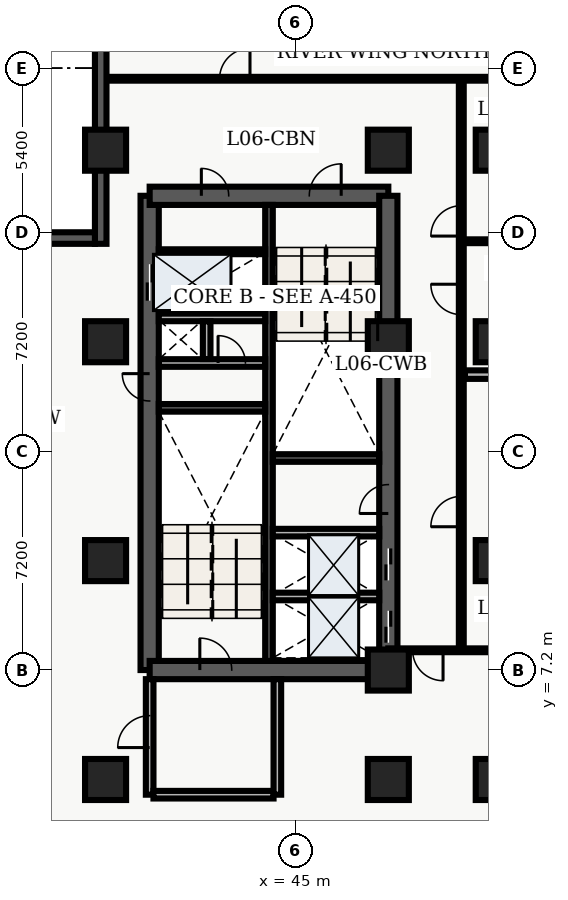
"""IFC4 building model, lengths in metres.
Left out: names, types, materials, properties, quantities, classifications, styles, units other than length and angle.
Written with IfcOpenShell. Run it as: python <this file> out.ifc"""

import sys

from ifc_helpers import new_model, entity, si_unit, converted_unit, direction, frame, origin_with_axes, origin_2d_with_axis, place, context, subcontext, project, spatial, polyline, rectangle, outline, extrude, element, fill, save


model = new_model("IFC4")
c1 = context("Model", 3, precision=1e-05, world=origin_with_axes(), true_north=direction((0.0, 1.0)))
c2 = subcontext(c1, "Body", "Model", "MODEL_VIEW")
j1 = project(units=[si_unit("LENGTHUNIT", "METRE"), converted_unit("PLANEANGLEUNIT", "DEGREE", entity("IfcPlaneAngleMeasure", 0.017), si_unit("PLANEANGLEUNIT", "RADIAN"), dimensions=[0, 0, 0, 0, 0, 0, 0])], contexts=[c1])
p1 = place(None, origin_with_axes())
s1 = spatial("IfcSite", under=j1, at=p1, CompositionType="ELEMENT")
p2 = place(p1, origin_with_axes())
s2 = spatial("IfcBuilding", under=s1, at=p2, CompositionType="ELEMENT")
p3 = place(p2, frame((0.0, 0.0, 28.8), z_axis=(0.0, 0.0, 1.0), x_axis=(1.0, 0.0, 0.0)))
s3 = spatial("IfcBuildingStorey", under=s2, at=p3, CompositionType="ELEMENT", Elevation=28.8)
p4 = place(p3, frame((40.2, 7.2, 0.0), z_axis=(0.0, 0.0, 1.0), x_axis=(0.0, 1.0, 0.0)))
e1 = element("IfcWall", 1, at=p4, inside=s3, PredefinedType="SHEAR", context=c2, shape_type="SweptSolid", body=[
    extrude(outline(polyline([(0.0, -0.3), (15.6, -0.3), (15.6, 0.3), (0.0, 0.3), (0.0, -0.3)])), origin_with_axes(), (0.0, 0.0, 1.0), 3.66),
])
p5 = place(p4, frame((12.75, 0.0, 0.0), z_axis=(0.0, 0.0, 1.0), x_axis=(1.0, 0.0, 0.0)))
e2 = element("IfcOpeningElement", 2, at=p5, cuts=e1, PredefinedType="OPENING", context=c2, shape_type="SweptSolid", body=[
    extrude(rectangle(XDim=1.2, YDim=0.62, at=origin_2d_with_axis()), origin_with_axes(), (0.0, 0.0, 1.0), 2.15),
])
p6 = place(p4, frame((9.3, 0.0, 0.0), z_axis=(0.0, 0.0, 1.0), x_axis=(1.0, 0.0, 0.0)))
e3 = element("IfcOpeningElement", 3, at=p6, cuts=e1, PredefinedType="OPENING", context=c2, shape_type="SweptSolid", body=[
    extrude(rectangle(XDim=0.9, YDim=0.62, at=origin_2d_with_axis()), origin_with_axes(), (0.0, 0.0, 1.0), 2.15),
])
p7 = place(p3, frame((40.2, 7.2, 0.0), z_axis=(0.0, 0.0, 1.0), x_axis=(1.0, 0.0, 0.0)))
e4 = element("IfcWall", 4, at=p7, inside=s3, PredefinedType="SHEAR", context=c2, shape_type="SweptSolid", body=[
    extrude(outline(polyline([(0.0, -0.3), (7.85, -0.3), (7.85, 0.3), (0.0, 0.3), (0.0, -0.3)])), origin_with_axes(), (0.0, 0.0, 1.0), 3.66),
])
p8 = place(p7, frame((2.175, 0.0, 0.0), z_axis=(0.0, 0.0, 1.0), x_axis=(1.0, 0.0, 0.0)))
e5 = element("IfcOpeningElement", 5, at=p8, cuts=e4, PredefinedType="OPENING", context=c2, shape_type="SweptSolid", body=[
    extrude(rectangle(XDim=1.05, YDim=0.62, at=origin_2d_with_axis()), origin_with_axes(), (0.0, 0.0, 1.0), 2.15),
])
p9 = place(p3, frame((40.2, 22.8, 0.0), z_axis=(0.0, 0.0, 1.0), x_axis=(1.0, 0.0, 0.0)))
e6 = element("IfcWall", 6, at=p9, inside=s3, PredefinedType="SHEAR", context=c2, shape_type="SweptSolid", body=[
    extrude(outline(polyline([(0.0, -0.3), (7.85, -0.3), (7.85, 0.3), (0.0, 0.3), (0.0, -0.3)])), origin_with_axes(), (0.0, 0.0, 1.0), 3.66),
])
p10 = place(p9, frame((5.775, 0.0, 0.0), z_axis=(0.0, 0.0, 1.0), x_axis=(1.0, 0.0, 0.0)))
e7 = element("IfcOpeningElement", 7, at=p10, cuts=e6, PredefinedType="OPENING", context=c2, shape_type="SweptSolid", body=[
    extrude(rectangle(XDim=1.05, YDim=0.62, at=origin_2d_with_axis()), origin_with_axes(), (0.0, 0.0, 1.0), 2.15),
])
p11 = place(p9, frame((2.15, 0.0, 0.0), z_axis=(0.0, 0.0, 1.0), x_axis=(1.0, 0.0, 0.0)))
e8 = element("IfcOpeningElement", 8, at=p11, cuts=e6, PredefinedType="OPENING", context=c2, shape_type="SweptSolid", body=[
    extrude(rectangle(XDim=0.9, YDim=0.62, at=origin_2d_with_axis()), origin_with_axes(), (0.0, 0.0, 1.0), 2.15),
])
p12 = place(p3, frame((48.05, 7.2, 0.0), z_axis=(0.0, 0.0, 1.0), x_axis=(0.0, 1.0, 0.0)))
e9 = element("IfcWall", 9, at=p12, inside=s3, PredefinedType="SHEAR", context=c2, shape_type="SweptSolid", body=[
    extrude(outline(polyline([(0.0, -0.3), (15.6, -0.3), (15.6, 0.3), (0.0, 0.3), (0.0, -0.3)])), origin_with_axes(), (0.0, 0.0, 1.0), 3.66),
])
p13 = place(p12, frame((1.425, 0.0, 0.0), z_axis=(0.0, 0.0, 1.0), x_axis=(1.0, 0.0, 0.0)))
e10 = element("IfcOpeningElement", 10, at=p13, cuts=e9, PredefinedType="OPENING", context=c2, shape_type="SweptSolid", body=[
    extrude(rectangle(XDim=1.05, YDim=0.62, at=origin_2d_with_axis()), origin_with_axes(), (0.0, 0.0, 1.0), 2.15),
])
p14 = place(p12, frame((3.475, 0.0, 0.0), z_axis=(0.0, 0.0, 1.0), x_axis=(1.0, 0.0, 0.0)))
e11 = element("IfcOpeningElement", 11, at=p14, cuts=e9, PredefinedType="OPENING", context=c2, shape_type="SweptSolid", body=[
    extrude(rectangle(XDim=1.05, YDim=0.62, at=origin_2d_with_axis()), origin_with_axes(), (0.0, 0.0, 1.0), 2.15),
])
p15 = place(p12, frame((5.625, 0.0, 0.0), z_axis=(0.0, 0.0, 1.0), x_axis=(1.0, 0.0, 0.0)))
e12 = element("IfcOpeningElement", 12, at=p15, cuts=e9, PredefinedType="OPENING", context=c2, shape_type="SweptSolid", body=[
    extrude(rectangle(XDim=0.95, YDim=0.62, at=origin_2d_with_axis()), origin_with_axes(), (0.0, 0.0, 1.0), 2.15),
])
p16 = place(p3, frame((44.125, 7.5, 0.0), z_axis=(0.0, 0.0, 1.0), x_axis=(0.0, 1.0, 0.0)))
e13 = element("IfcWall", 13, at=p16, inside=s3, PredefinedType="SHEAR", context=c2, shape_type="SweptSolid", body=[
    extrude(outline(polyline([(0.0, -0.125), (15.0, -0.125), (15.0, 0.125), (0.0, 0.125), (0.0, -0.125)])), origin_with_axes(), (0.0, 0.0, 1.0), 3.66),
])
for number, where, z_axis, x_axis in (
    (14, (40.5, 15.825, 0.0), (0.0, 0.0, 1.0), (1.0, 0.0, 0.0)),
    (15, (44.25, 14.175, 0.0), (0.0, 0.0, 1.0), (1.0, 0.0, 0.0)),
):
    element("IfcWall", number, at=place(p3, frame(where, z_axis=z_axis, x_axis=x_axis)), inside=s3, PredefinedType="SHEAR", context=c2, shape_type="SweptSolid", body=[
        extrude(outline(polyline([(0.0, -0.125), (3.5, -0.125), (3.5, 0.125), (0.0, 0.125), (0.0, -0.125)])), origin_with_axes(), (0.0, 0.0, 1.0), 3.66),
    ])
p17 = place(p3, frame((40.5, 17.3, 0.0), z_axis=(0.0, 0.0, 1.0), x_axis=(1.0, 0.0, 0.0)))
e16 = element("IfcWall", 16, at=p17, inside=s3, PredefinedType="SOLIDWALL", context=c2, shape_type="SweptSolid", body=[
    extrude(outline(polyline([(0.0, -0.125), (3.5, -0.125), (3.5, 0.125), (0.0, 0.125), (0.0, -0.125)])), origin_with_axes(), (0.0, 0.0, 1.0), 2.7),
])
p18 = place(p17, frame((2.4, 0.0, 0.0), z_axis=(0.0, 0.0, 1.0), x_axis=(1.0, 0.0, 0.0)))
e17 = element("IfcOpeningElement", 17, at=p18, cuts=e16, PredefinedType="OPENING", context=c2, shape_type="SweptSolid", body=[
    extrude(rectangle(XDim=0.9, YDim=0.27, at=origin_2d_with_axis()), origin_with_axes(), (0.0, 0.0, 1.0), 2.15),
])
p19 = place(p3, frame((40.5, 18.8, 0.0), z_axis=(0.0, 0.0, 1.0), x_axis=(1.0, 0.0, 0.0)))
e18 = element("IfcWall", 18, at=p19, inside=s3, PredefinedType="SOLIDWALL", context=c2, shape_type="SweptSolid", body=[
    extrude(outline(polyline([(0.0, -0.125), (3.5, -0.125), (3.5, 0.125), (0.0, 0.125), (0.0, -0.125)])), origin_with_axes(), (0.0, 0.0, 1.0), 2.7),
])
p20 = place(p3, frame((42.075, 17.43, 0.0), z_axis=(0.0, 0.0, 1.0), x_axis=(0.0, 1.0, 0.0)))
e19 = element("IfcWall", 19, at=p20, inside=s3, PredefinedType="SOLIDWALL", context=c2, shape_type="SweptSolid", body=[
    extrude(outline(polyline([(0.0, -0.125), (1.24, -0.125), (1.24, 0.125), (0.0, 0.125), (0.0, -0.125)])), origin_with_axes(), (0.0, 0.0, 1.0), 2.7),
])
p21 = place(p3, frame((40.2, 3.1, 0.0), z_axis=(0.0, 0.0, 1.0), x_axis=(0.0, 1.0, 0.0)))
e20 = element("IfcWall", 20, at=p21, inside=s3, PredefinedType="SOLIDWALL", context=c2, shape_type="SweptSolid", body=[
    extrude(outline(polyline([(0.0, -0.125), (3.8, -0.125), (3.8, 0.125), (0.0, 0.125), (0.0, -0.125)])), origin_with_axes(), (0.0, 0.0, 1.0), 2.7),
])
p22 = place(p21, frame((2.075, 0.0, 0.0), z_axis=(0.0, 0.0, 1.0), x_axis=(1.0, 0.0, 0.0)))
e21 = element("IfcOpeningElement", 21, at=p22, cuts=e20, PredefinedType="OPENING", context=c2, shape_type="SweptSolid", body=[
    extrude(rectangle(XDim=1.05, YDim=0.27, at=origin_2d_with_axis()), origin_with_axes(), (0.0, 0.0, 1.0), 2.15),
])
p23 = place(p3, frame((40.325, 3.1, 0.0), z_axis=(0.0, 0.0, 1.0), x_axis=(1.0, 0.0, 0.0)))
e22 = element("IfcWall", 22, at=p23, inside=s3, PredefinedType="SOLIDWALL", context=c2, shape_type="SweptSolid", body=[
    extrude(outline(polyline([(0.0, -0.125), (3.95, -0.125), (3.95, 0.125), (0.0, 0.125), (0.0, -0.125)])), origin_with_axes(), (0.0, 0.0, 1.0), 2.7),
])
p24 = place(p3, frame((44.4, 3.1, 0.0), z_axis=(0.0, 0.0, 1.0), x_axis=(0.0, 1.0, 0.0)))
e23 = element("IfcWall", 23, at=p24, inside=s3, PredefinedType="SOLIDWALL", context=c2, shape_type="SweptSolid", body=[
    extrude(outline(polyline([(0.0, -0.125), (3.8, -0.125), (3.8, 0.125), (0.0, 0.125), (0.0, -0.125)])), origin_with_axes(), (0.0, 0.0, 1.0), 2.7),
])
for number, where, z_axis, x_axis in (
    (24, (38.75, 3.6, 0.0), (0.0, 0.0, 1.0), (1.0, 0.0, 0.0)),
    (25, (38.75, 10.8, 0.0), (0.0, 0.0, 1.0), (1.0, 0.0, 0.0)),
    (26, (38.75, 18.0, 0.0), (0.0, 0.0, 1.0), (1.0, 0.0, 0.0)),
    (27, (38.75, 24.3, 0.0), (0.0, 0.0, 1.0), (1.0, 0.0, 0.0)),
    (28, (48.05, 3.6, 0.0), (0.0, 0.0, 1.0), (1.0, 0.0, 0.0)),
    (29, (48.05, 7.2, 0.0), (0.0, 0.0, 1.0), (1.0, 0.0, 0.0)),
    (30, (48.05, 18.0, 0.0), (0.0, 0.0, 1.0), (1.0, 0.0, 0.0)),
    (31, (48.05, 24.3, 0.0), (0.0, 0.0, 1.0), (1.0, 0.0, 0.0)),
    (32, (51.6, 3.6, 0.0), (0.0, 0.0, 1.0), (1.0, 0.0, 0.0)),
    (33, (51.6, 10.8, 0.0), (0.0, 0.0, 1.0), (1.0, 0.0, 0.0)),
    (34, (51.6, 18.0, 0.0), (0.0, 0.0, 1.0), (1.0, 0.0, 0.0)),
    (35, (51.6, 24.3, 0.0), (0.0, 0.0, 1.0), (1.0, 0.0, 0.0)),
):
    element("IfcColumn", number, at=place(p3, frame(where, z_axis=z_axis, x_axis=x_axis)), inside=s3, PredefinedType="COLUMN", context=c2, shape_type="SweptSolid", body=[
        extrude(rectangle(XDim=1.35, YDim=1.35, at=origin_2d_with_axis()), origin_with_axes(), (0.0, 0.0, 1.0), 3.9),
    ])
p25 = place(p3, frame((40.5, 20.96, 0.0), z_axis=(0.0, 0.0, 1.0), x_axis=(1.0, 0.0, 0.0)))
e36 = element("IfcWall", 36, at=p25, inside=s3, PredefinedType="PARTITIONING", context=c2, shape_type="SweptSolid", body=[
    extrude(outline(polyline([(0.0, -0.08), (3.5, -0.08), (3.5, 0.08), (0.0, 0.08), (0.0, -0.08)])), origin_with_axes(), (0.0, 0.0, 1.0), 2.7),
])
for number, where, z_axis, x_axis in (
    (37, (44.25, 9.62, 0.0), (0.0, 0.0, 1.0), (1.0, 0.0, 0.0)),
    (38, (44.25, 11.72, 0.0), (0.0, 0.0, 1.0), (1.0, 0.0, 0.0)),
):
    element("IfcWall", number, at=place(p3, frame(where, z_axis=z_axis, x_axis=x_axis)), inside=s3, PredefinedType="SOLIDWALL", context=c2, shape_type="SweptSolid", body=[
        extrude(outline(polyline([(0.0, -0.125), (3.5, -0.125), (3.5, 0.125), (0.0, 0.125), (0.0, -0.125)])), origin_with_axes(), (0.0, 0.0, 1.0), 2.7),
    ])
p26 = place(p3, frame((50.45, 7.85, 0.0), z_axis=(0.0, 0.0, 1.0), x_axis=(0.0, 1.0, 0.0)))
e39 = element("IfcWall", 39, at=p26, inside=s3, PredefinedType="PARTITIONING", context=c2, shape_type="SweptSolid", body=[
    extrude(outline(polyline([(0.0, -0.08), (18.8, -0.08), (18.8, 0.08), (0.0, 0.08), (0.0, -0.08)])), origin_with_axes(), (0.0, 0.0, 1.0), 2.7),
])
p27 = place(p26, frame((4.564, 0.0, 0.0), z_axis=(0.0, 0.0, 1.0), x_axis=(1.0, 0.0, 0.0)))
e40 = element("IfcOpeningElement", 40, at=p27, cuts=e39, PredefinedType="OPENING", context=c2, shape_type="SweptSolid", body=[
    extrude(rectangle(XDim=1.0, YDim=0.18, at=origin_2d_with_axis()), origin_with_axes(), (0.0, 0.0, 1.0), 2.15),
])
p28 = place(p26, frame((11.541, 0.0, 0.0), z_axis=(0.0, 0.0, 1.0), x_axis=(1.0, 0.0, 0.0)))
e41 = element("IfcOpeningElement", 41, at=p28, cuts=e39, PredefinedType="OPENING", context=c2, shape_type="SweptSolid", body=[
    extrude(rectangle(XDim=1.0, YDim=0.18, at=origin_2d_with_axis()), origin_with_axes(), (0.0, 0.0, 1.0), 2.15),
])
p29 = place(p26, frame((14.125, 0.0, 0.0), z_axis=(0.0, 0.0, 1.0), x_axis=(1.0, 0.0, 0.0)))
e42 = element("IfcOpeningElement", 42, at=p29, cuts=e39, PredefinedType="OPENING", context=c2, shape_type="SweptSolid", body=[
    extrude(rectangle(XDim=1.0, YDim=0.18, at=origin_2d_with_axis()), origin_with_axes(), (0.0, 0.0, 1.0), 2.15),
])
p30 = place(p3, frame((59.64, 7.85, 0.0), z_axis=(0.0, 0.0, 1.0), x_axis=(-1.0, 0.0, 0.0)))
e43 = element("IfcWall", 43, at=p30, inside=s3, PredefinedType="PARTITIONING", context=c2, shape_type="SweptSolid", body=[
    extrude(outline(polyline([(0.0, -0.062), (11.59, -0.062), (11.59, 0.062), (0.0, 0.062), (0.0, -0.062)])), origin_with_axes(), (0.0, 0.0, 1.0), 2.7),
])
p31 = place(p30, frame((10.29, 0.0, 0.0), z_axis=(0.0, 0.0, 1.0), x_axis=(1.0, 0.0, 0.0)))
e44 = element("IfcOpeningElement", 44, at=p31, cuts=e43, PredefinedType="OPENING", context=c2, shape_type="SweptSolid", body=[
    extrude(rectangle(XDim=1.0, YDim=0.145, at=origin_2d_with_axis()), origin_with_axes(), (0.0, 0.0, 1.0), 2.15),
])
p32 = place(p3, frame((38.76, 26.65, 0.0), z_axis=(0.0, 0.0, 1.0), x_axis=(1.0, 0.0, 0.0)))
e45 = element("IfcWall", 45, at=p32, inside=s3, PredefinedType="PARTITIONING", context=c2, shape_type="SweptSolid", body=[
    extrude(outline(polyline([(0.0, -0.062), (20.88, -0.062), (20.88, 0.062), (0.0, 0.062), (0.0, -0.062)])), origin_with_axes(), (0.0, 0.0, 1.0), 2.7),
])
p33 = place(p32, frame((4.24, 0.0, 0.0), z_axis=(0.0, 0.0, 1.0), x_axis=(1.0, 0.0, 0.0)))
e46 = element("IfcOpeningElement", 46, at=p33, cuts=e45, PredefinedType="OPENING", context=c2, shape_type="SweptSolid", body=[
    extrude(rectangle(XDim=1.0, YDim=0.145, at=origin_2d_with_axis()), origin_with_axes(), (0.0, 0.0, 1.0), 2.15),
])
p34 = place(p3, frame((50.57, 16.918, 0.0), z_axis=(0.0, 0.0, 1.0), x_axis=(1.0, 0.0, 0.0)))
e47 = element("IfcWall", 47, at=p34, inside=s3, PredefinedType="PARTITIONING", context=c2, shape_type="SweptSolid", body=[
    extrude(outline(polyline([(0.0, -0.14), (9.055, -0.14), (9.055, 0.14), (0.0, 0.14), (0.0, -0.14)])), origin_with_axes(), (0.0, 0.0, 1.0), 2.7),
])
p35 = place(p3, frame((50.57, 21.305, 0.0), z_axis=(0.0, 0.0, 1.0), x_axis=(1.0, 0.0, 0.0)))
e48 = element("IfcWall", 48, at=p35, inside=s3, PredefinedType="PARTITIONING", context=c2, shape_type="SweptSolid", body=[
    extrude(outline(polyline([(0.0, -0.062), (9.055, -0.062), (9.055, 0.062), (0.0, 0.062), (0.0, -0.062)])), origin_with_axes(), (0.0, 0.0, 1.0), 2.7),
])
p36 = place(p3, frame((38.59, 21.22, 0.0), z_axis=(0.0, 0.0, 1.0), x_axis=(0.0, 1.0, 0.0)))
e49 = element("IfcWall", 49, at=p36, inside=s3, PredefinedType="SOLIDWALL", context=c2, shape_type="SweptSolid", body=[
    extrude(outline(polyline([(0.0, -0.19), (7.58, -0.19), (7.58, 0.19), (0.0, 0.19), (0.0, -0.19)])), origin_with_axes(), (0.0, 0.0, 1.0), 3.66),
])
p37 = place(p3, frame((21.22, 21.41, 0.0), z_axis=(0.0, 0.0, 1.0), x_axis=(1.0, 0.0, 0.0)))
e50 = element("IfcWall", 50, at=p37, inside=s3, PredefinedType="SOLIDWALL", context=c2, shape_type="SweptSolid", body=[
    extrude(outline(polyline([(0.0, -0.19), (17.18, -0.19), (17.18, 0.19), (0.0, 0.19), (0.0, -0.19)])), origin_with_axes(), (0.0, 0.0, 1.0), 3.66),
])
p38 = place(p37, frame((3.263, 0.0, 0.45), z_axis=(0.0, 0.0, 1.0), x_axis=(1.0, 0.0, 0.0)))
e51 = element("IfcOpeningElement", 51, at=p38, cuts=e50, PredefinedType="OPENING", context=c2, shape_type="SweptSolid", body=[
    extrude(rectangle(XDim=2.1, YDim=0.4, at=origin_2d_with_axis()), origin_with_axes(), (0.0, 0.0, 1.0), 2.2),
])
p39 = place(p37, frame((8.59, 0.0, 0.45), z_axis=(0.0, 0.0, 1.0), x_axis=(1.0, 0.0, 0.0)))
e52 = element("IfcOpeningElement", 52, at=p39, cuts=e50, PredefinedType="OPENING", context=c2, shape_type="SweptSolid", body=[
    extrude(rectangle(XDim=2.1, YDim=0.4, at=origin_2d_with_axis()), origin_with_axes(), (0.0, 0.0, 1.0), 2.2),
])
p40 = place(p37, frame((13.467, 0.0, 0.45), z_axis=(0.0, 0.0, 1.0), x_axis=(1.0, 0.0, 0.0)))
e53 = element("IfcOpeningElement", 53, at=p40, cuts=e50, PredefinedType="OPENING", context=c2, shape_type="SweptSolid", body=[
    extrude(rectangle(XDim=2.1, YDim=0.4, at=origin_2d_with_axis()), origin_with_axes(), (0.0, 0.0, 1.0), 2.2),
])
p41 = place(p12, frame((1.425, 0.0, 0.0), z_axis=(0.0, 0.0, 1.0), x_axis=(1.0, 0.0, 0.0)))
e54 = element("IfcDoor", 54, at=p41, inside=s3, OperationType="SLIDING_TO_LEFT", PredefinedType="DOOR", context=c2, shape_type="SweptSolid", body=[
    extrude(rectangle(XDim=1.05, YDim=0.09, at=origin_2d_with_axis()), origin_with_axes(), (0.0, 0.0, 1.0), 2.15),
])
fill(e10, e54)
p42 = place(p12, frame((3.475, 0.0, 0.0), z_axis=(0.0, 0.0, 1.0), x_axis=(1.0, 0.0, 0.0)))
e55 = element("IfcDoor", 55, at=p42, inside=s3, OperationType="SLIDING_TO_RIGHT", PredefinedType="DOOR", context=c2, shape_type="SweptSolid", body=[
    extrude(rectangle(XDim=1.05, YDim=0.09, at=origin_2d_with_axis()), origin_with_axes(), (0.0, 0.0, 1.0), 2.15),
])
fill(e11, e55)
p43 = place(p4, frame((12.75, 0.0, 0.0), z_axis=(0.0, 0.0, 1.0), x_axis=(1.0, 0.0, 0.0)))
e56 = element("IfcDoor", 56, at=p43, inside=s3, OperationType="DOUBLE_DOOR_SLIDING", PredefinedType="DOOR", context=c2, shape_type="SweptSolid", body=[
    extrude(rectangle(XDim=1.2, YDim=0.09, at=origin_2d_with_axis()), origin_with_axes(), (0.0, 0.0, 1.0), 2.15),
])
fill(e2, e56)
p44 = place(p4, frame((9.3, 0.0, 0.0), z_axis=(0.0, 0.0, 1.0), x_axis=(1.0, 0.0, 0.0)))
e57 = element("IfcDoor", 57, at=p44, inside=s3, OperationType="SINGLE_SWING_RIGHT", PredefinedType="DOOR", context=c2, shape_type="SweptSolid", body=[
    extrude(rectangle(XDim=0.9, YDim=0.09, at=origin_2d_with_axis()), origin_with_axes(), (0.0, 0.0, 1.0), 2.15),
])
fill(e3, e57)
p45 = place(p17, frame((2.4, 0.0, 0.0), z_axis=(0.0, 0.0, 1.0), x_axis=(1.0, 0.0, 0.0)))
e58 = element("IfcDoor", 58, at=p45, inside=s3, OperationType="SINGLE_SWING_LEFT", PredefinedType="DOOR", context=c2, shape_type="SweptSolid", body=[
    extrude(rectangle(XDim=0.9, YDim=0.09, at=origin_2d_with_axis()), origin_with_axes(), (0.0, 0.0, 1.0), 2.15),
])
fill(e17, e58)
p46 = place(p7, frame((2.175, 0.0, 0.0), z_axis=(0.0, 0.0, 1.0), x_axis=(1.0, 0.0, 0.0)))
e59 = element("IfcDoor", 59, at=p46, inside=s3, OperationType="SINGLE_SWING_LEFT", PredefinedType="DOOR", context=c2, shape_type="SweptSolid", body=[
    extrude(rectangle(XDim=1.05, YDim=0.09, at=origin_2d_with_axis()), origin_with_axes(), (0.0, 0.0, 1.0), 2.15),
])
fill(e5, e59)
p47 = place(p9, frame((5.775, 0.0, 0.0), z_axis=(0.0, 0.0, 1.0), x_axis=(1.0, 0.0, 0.0)))
e60 = element("IfcDoor", 60, at=p47, inside=s3, OperationType="SINGLE_SWING_RIGHT", PredefinedType="DOOR", context=c2, shape_type="SweptSolid", body=[
    extrude(rectangle(XDim=1.05, YDim=0.09, at=origin_2d_with_axis()), origin_with_axes(), (0.0, 0.0, 1.0), 2.15),
])
fill(e7, e60)
p48 = place(p21, frame((2.075, 0.0, 0.0), z_axis=(0.0, 0.0, 1.0), x_axis=(1.0, 0.0, 0.0)))
e61 = element("IfcDoor", 61, at=p48, inside=s3, OperationType="SINGLE_SWING_LEFT", PredefinedType="DOOR", context=c2, shape_type="SweptSolid", body=[
    extrude(rectangle(XDim=1.05, YDim=0.09, at=origin_2d_with_axis()), origin_with_axes(), (0.0, 0.0, 1.0), 2.15),
])
fill(e21, e61)
p49 = place(p9, frame((2.15, 0.0, 0.0), z_axis=(0.0, 0.0, 1.0), x_axis=(1.0, 0.0, 0.0)))
e62 = element("IfcDoor", 62, at=p49, inside=s3, OperationType="SINGLE_SWING_LEFT", PredefinedType="DOOR", context=c2, shape_type="SweptSolid", body=[
    extrude(rectangle(XDim=0.9, YDim=0.09, at=origin_2d_with_axis()), origin_with_axes(), (0.0, 0.0, 1.0), 2.15),
])
fill(e8, e62)
p50 = place(p12, frame((5.625, 0.0, 0.0), z_axis=(0.0, 0.0, 1.0), x_axis=(1.0, 0.0, 0.0)))
e63 = element("IfcDoor", 63, at=p50, inside=s3, OperationType="SINGLE_SWING_LEFT", PredefinedType="DOOR", context=c2, shape_type="SweptSolid", body=[
    extrude(rectangle(XDim=0.95, YDim=0.09, at=origin_2d_with_axis()), origin_with_axes(), (0.0, 0.0, 1.0), 2.15),
])
fill(e12, e63)
p51 = place(p30, frame((10.29, 0.0, 0.0), z_axis=(0.0, 0.0, 1.0), x_axis=(1.0, 0.0, 0.0)))
e64 = element("IfcDoor", 64, at=p51, inside=s3, OperationType="SINGLE_SWING_LEFT", PredefinedType="DOOR", context=c2, shape_type="SweptSolid", body=[
    extrude(rectangle(XDim=1.0, YDim=0.075, at=origin_2d_with_axis()), origin_with_axes(), (0.0, 0.0, 1.0), 2.15),
])
fill(e44, e64)
p52 = place(p32, frame((4.24, 0.0, 0.0), z_axis=(0.0, 0.0, 1.0), x_axis=(1.0, 0.0, 0.0)))
e65 = element("IfcDoor", 65, at=p52, inside=s3, OperationType="SINGLE_SWING_RIGHT", PredefinedType="DOOR", context=c2, shape_type="SweptSolid", body=[
    extrude(rectangle(XDim=1.0, YDim=0.075, at=origin_2d_with_axis()), origin_with_axes(), (0.0, 0.0, 1.0), 2.15),
])
fill(e46, e65)
p53 = place(p26, frame((4.564, 0.0, 0.0), z_axis=(0.0, 0.0, 1.0), x_axis=(1.0, 0.0, 0.0)))
e66 = element("IfcDoor", 66, at=p53, inside=s3, OperationType="SINGLE_SWING_LEFT", PredefinedType="DOOR", context=c2, shape_type="SweptSolid", body=[
    extrude(rectangle(XDim=1.0, YDim=0.09, at=origin_2d_with_axis()), origin_with_axes(), (0.0, 0.0, 1.0), 2.15),
])
fill(e40, e66)
p54 = place(p26, frame((11.541, 0.0, 0.0), z_axis=(0.0, 0.0, 1.0), x_axis=(1.0, 0.0, 0.0)))
e67 = element("IfcDoor", 67, at=p54, inside=s3, OperationType="SINGLE_SWING_RIGHT", PredefinedType="DOOR", context=c2, shape_type="SweptSolid", body=[
    extrude(rectangle(XDim=1.0, YDim=0.09, at=origin_2d_with_axis()), origin_with_axes(), (0.0, 0.0, 1.0), 2.15),
])
fill(e41, e67)
p55 = place(p26, frame((14.125, 0.0, 0.0), z_axis=(0.0, 0.0, 1.0), x_axis=(1.0, 0.0, 0.0)))
e68 = element("IfcDoor", 68, at=p55, inside=s3, OperationType="SINGLE_SWING_LEFT", PredefinedType="DOOR", context=c2, shape_type="SweptSolid", body=[
    extrude(rectangle(XDim=1.0, YDim=0.09, at=origin_2d_with_axis()), origin_with_axes(), (0.0, 0.0, 1.0), 2.15),
])
fill(e42, e68)
save(model, sys.argv[1])
